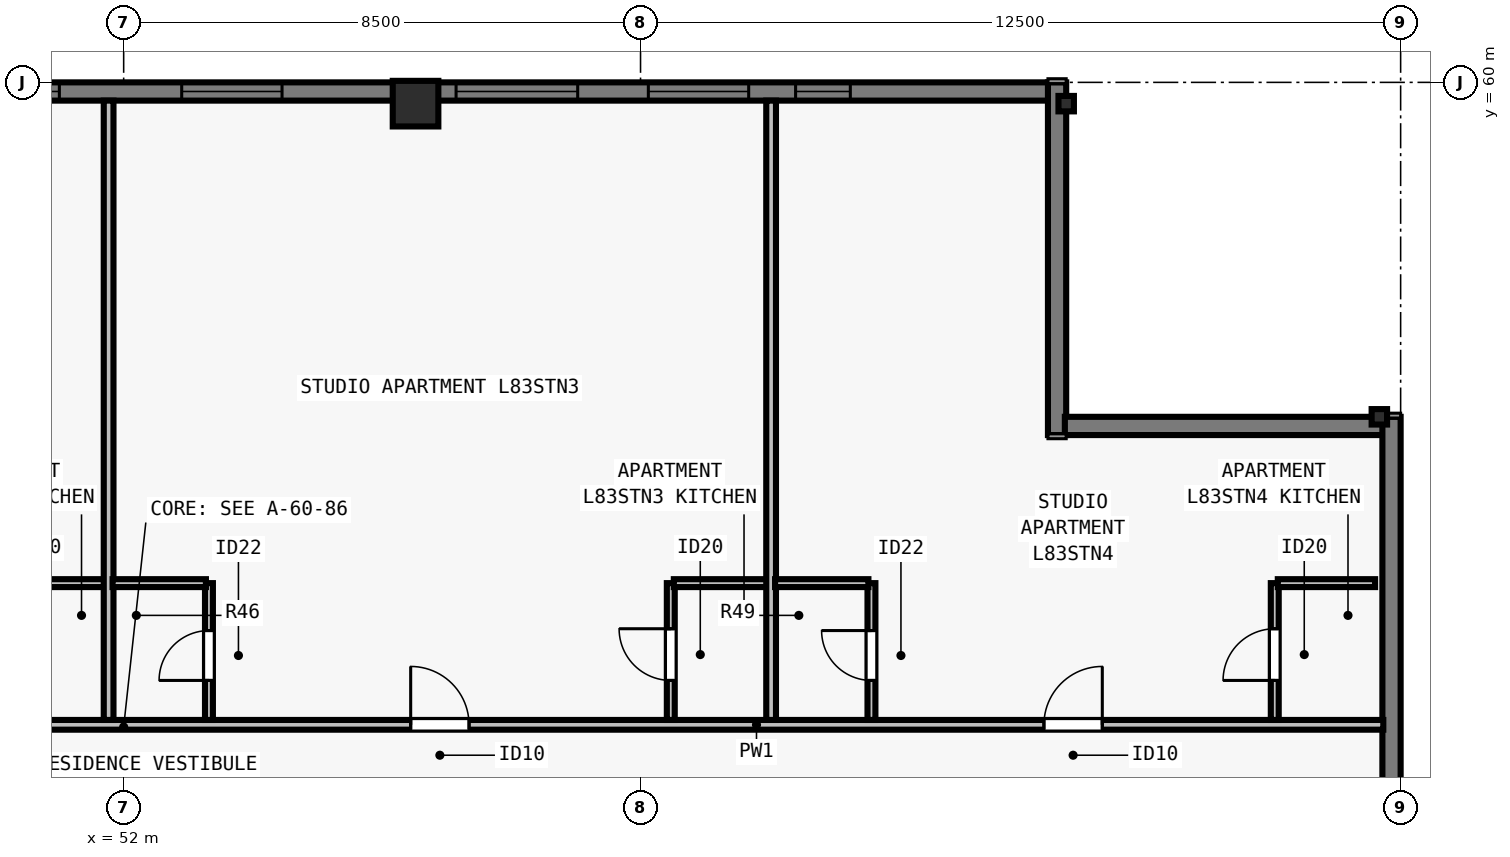
"""IFC4 building model, lengths in metres.
Left out: names, types, materials, properties, quantities, classifications, styles, units other than length and angle.
Written with IfcOpenShell. Run it as: python <this file> out.ifc"""

import sys

from ifc_helpers import new_model, si_unit, direction, frame, frame_2d, origin, origin_2d, place, context, subcontext, project, spatial, rectangle, i_section, extrude, element, fill, save


model = new_model("IFC4")
c1 = context("Model", 3, precision=1e-05, world=origin(), true_north=direction((0.0, 1.0)))
c2 = subcontext(c1, "Body", "Model", "MODEL_VIEW")
j1 = project(units=[si_unit("LENGTHUNIT", "METRE"), si_unit("PLANEANGLEUNIT", "RADIAN")], contexts=[c1])
p1 = place(None, origin())
s1 = spatial("IfcSite", under=j1, at=p1, CompositionType="ELEMENT")
p2 = place(p1, origin())
s2 = spatial("IfcBuilding", under=s1, at=p2, CompositionType="ELEMENT")
p3 = place(p2, frame((0.0, 0.0, 301.5)))
s3 = spatial("IfcBuildingStorey", under=s2, at=p3, CompositionType="ELEMENT", Elevation=301.5)
for number, where, z_axis, x_axis in (
    (1, (72.65, 54.5, 0.0), (0.0, 0.0, 1.0), (0.0, 1.0, 0.0)),
    (2, (67.5, 59.65, 0.0), (0.0, 0.0, 1.0), (1.0, 0.0, 0.0)),
):
    element("IfcColumn", number, at=place(p3, frame(where, z_axis=z_axis, x_axis=x_axis)), inside=s3, PredefinedType="COLUMN", context=c2, shape_type="SweptSolid", body=[
        extrude(i_section(OverallWidth=0.254, OverallDepth=0.254, WebThickness=0.009, FlangeThickness=0.014, FilletRadius=0.013, at=origin_2d()), origin(), (0.0, 0.0, 1.0), 3.5),
    ])
p4 = place(p3, frame((56.8, 59.65, 0.0), z_axis=(0.0, 0.0, 1.0), x_axis=(1.0, 0.0, 0.0)))
e3 = element("IfcColumn", 3, at=p4, inside=s3, PredefinedType="COLUMN", context=c2, shape_type="SweptSolid", body=[
    extrude(rectangle(XDim=0.75, YDim=0.75, at=origin_2d()), origin(), (0.0, 0.0, 1.0), 3.5),
])
p5 = place(p3, frame((36.5, 59.85, 0.0), z_axis=(0.0, 0.0, 1.0), x_axis=(1.0, 0.0, 0.0)))
e4 = element("IfcWall", 4, at=p5, inside=s3, PredefinedType="SOLIDWALL", context=c2, shape_type="SweptSolid", body=[
    extrude(rectangle(XDim=30.722, YDim=0.3, at=frame_2d((15.361, 0.0))), origin(), (0.0, 0.0, 1.0), 3.29),
])
p6 = place(p5, frame((6.019, 0.0, 0.8)))
e5 = element("IfcOpeningElement", 5, at=p6, cuts=e4, PredefinedType="OPENING", context=c2, shape_type="SweptSolid", body=[
    extrude(rectangle(XDim=2.0, YDim=1.758, at=frame_2d((1.0, 0.879))), frame((0.0, 0.16, 0.0), z_axis=(0.0, -1.0, 0.0), x_axis=(1.0, 0.0, 0.0)), (0.0, 0.0, 1.0), 0.32),
])
p7 = place(p5, frame((8.331, 0.0, 0.8)))
e6 = element("IfcOpeningElement", 6, at=p7, cuts=e4, PredefinedType="OPENING", context=c2, shape_type="SweptSolid", body=[
    extrude(rectangle(XDim=1.65, YDim=1.758, at=frame_2d((0.825, 0.879))), frame((0.0, 0.16, 0.0), z_axis=(0.0, -1.0, 0.0), x_axis=(1.0, 0.0, 0.0)), (0.0, 0.0, 1.0), 0.32),
])
p8 = place(p5, frame((12.442, 0.0, 0.8)))
e7 = element("IfcOpeningElement", 7, at=p8, cuts=e4, PredefinedType="OPENING", context=c2, shape_type="SweptSolid", body=[
    extrude(rectangle(XDim=2.0, YDim=1.758, at=frame_2d((1.0, 0.879))), frame((0.0, 0.16, 0.0), z_axis=(0.0, -1.0, 0.0), x_axis=(1.0, 0.0, 0.0)), (0.0, 0.0, 1.0), 0.32),
])
p9 = place(p5, frame((16.455, 0.0, 0.8)))
e8 = element("IfcOpeningElement", 8, at=p9, cuts=e4, PredefinedType="OPENING", context=c2, shape_type="SweptSolid", body=[
    extrude(rectangle(XDim=1.65, YDim=1.758, at=frame_2d((0.825, 0.879))), frame((0.0, 0.16, 0.0), z_axis=(0.0, -1.0, 0.0), x_axis=(1.0, 0.0, 0.0)), (0.0, 0.0, 1.0), 0.32),
])
p10 = place(p5, frame((20.967, 0.0, 0.8)))
e9 = element("IfcOpeningElement", 9, at=p10, cuts=e4, PredefinedType="OPENING", context=c2, shape_type="SweptSolid", body=[
    extrude(rectangle(XDim=2.0, YDim=1.758, at=frame_2d((1.0, 0.879))), frame((0.0, 0.16, 0.0), z_axis=(0.0, -1.0, 0.0), x_axis=(1.0, 0.0, 0.0)), (0.0, 0.0, 1.0), 0.32),
])
p11 = place(p5, frame((24.128, 0.0, 0.8)))
e10 = element("IfcOpeningElement", 10, at=p11, cuts=e4, PredefinedType="OPENING", context=c2, shape_type="SweptSolid", body=[
    extrude(rectangle(XDim=1.65, YDim=1.758, at=frame_2d((0.825, 0.879))), frame((0.0, 0.16, 0.0), z_axis=(0.0, -1.0, 0.0), x_axis=(1.0, 0.0, 0.0)), (0.0, 0.0, 1.0), 0.32),
])
p12 = place(p5, frame((26.55, 0.0, 0.8)))
e11 = element("IfcOpeningElement", 11, at=p12, cuts=e4, PredefinedType="OPENING", context=c2, shape_type="SweptSolid", body=[
    extrude(rectangle(XDim=0.9, YDim=1.75, at=frame_2d((0.45, 0.875))), frame((0.0, 0.16, 0.0), z_axis=(0.0, -1.0, 0.0), x_axis=(1.0, 0.0, 0.0)), (0.0, 0.0, 1.0), 0.32),
])
p13 = place(p3, frame((67.35, 60.0, 0.0), z_axis=(0.0, 0.0, 1.0), x_axis=(0.0, -1.0, 0.0)))
e12 = element("IfcWall", 12, at=p13, inside=s3, PredefinedType="SOLIDWALL", context=c2, shape_type="SweptSolid", body=[
    extrude(rectangle(XDim=5.8, YDim=0.3, at=frame_2d((2.9, 0.0))), origin(), (0.0, 0.0, 1.0), 3.29),
])
p14 = place(p3, frame((67.478, 54.35, 0.0), z_axis=(0.0, 0.0, 1.0), x_axis=(1.0, 0.0, 0.0)))
e13 = element("IfcWall", 13, at=p14, inside=s3, PredefinedType="SOLIDWALL", context=c2, shape_type="SweptSolid", body=[
    extrude(rectangle(XDim=5.244, YDim=0.3, at=frame_2d((2.622, 0.0))), origin(), (0.0, 0.0, 1.0), 3.29),
])
p15 = place(p3, frame((72.85, 54.5, 0.0), z_axis=(0.0, 0.0, 1.0), x_axis=(0.0, -1.0, 0.0)))
e14 = element("IfcWall", 14, at=p15, inside=s3, PredefinedType="SOLIDWALL", context=c2, shape_type="SweptSolid", body=[
    extrude(rectangle(XDim=12.622, YDim=0.3, at=frame_2d((6.311, 0.0))), origin(), (0.0, 0.0, 1.0), 3.29),
])
p16 = place(p15, frame((8.217, 0.0, 0.8)))
e15 = element("IfcOpeningElement", 15, at=p16, cuts=e14, PredefinedType="OPENING", context=c2, shape_type="SweptSolid", body=[
    extrude(rectangle(XDim=1.65, YDim=1.758, at=frame_2d((0.825, 0.879))), frame((0.0, 0.16, 0.0), z_axis=(0.0, -1.0, 0.0), x_axis=(1.0, 0.0, 0.0)), (0.0, 0.0, 1.0), 0.32),
])
p17 = place(p3, frame((31.285, 49.435, 0.0), z_axis=(0.0, 0.0, 1.0), x_axis=(1.0, 0.0, 0.0)))
e16 = element("IfcWall", 16, at=p17, inside=s3, PredefinedType="PARTITIONING", context=c2, shape_type="SweptSolid", body=[
    extrude(rectangle(XDim=41.43, YDim=0.16, at=frame_2d((20.715, 0.0))), origin(), (0.0, 0.0, 1.0), 3.009),
])
p18 = place(p17, frame((4.979, 0.0, 0.0)))
e17 = element("IfcOpeningElement", 17, at=p18, cuts=e16, PredefinedType="OPENING", context=c2, shape_type="SweptSolid", body=[
    extrude(rectangle(XDim=0.96, YDim=2.18, at=frame_2d((0.48, 1.09))), frame((0.0, 0.09, 0.0), z_axis=(0.0, -1.0, 0.0), x_axis=(1.0, 0.0, 0.0)), (0.0, 0.0, 1.0), 0.18),
])
p19 = place(p17, frame((15.145, 0.0, 0.0)))
e18 = element("IfcOpeningElement", 18, at=p19, cuts=e16, PredefinedType="OPENING", context=c2, shape_type="SweptSolid", body=[
    extrude(rectangle(XDim=0.96, YDim=2.18, at=frame_2d((0.48, 1.09))), frame((0.0, 0.09, 0.0), z_axis=(0.0, -1.0, 0.0), x_axis=(1.0, 0.0, 0.0)), (0.0, 0.0, 1.0), 0.18),
])
p20 = place(p17, frame((25.435, 0.0, 0.0)))
e19 = element("IfcOpeningElement", 19, at=p20, cuts=e16, PredefinedType="OPENING", context=c2, shape_type="SweptSolid", body=[
    extrude(rectangle(XDim=0.96, YDim=2.18, at=frame_2d((0.48, 1.09))), frame((0.0, 0.09, 0.0), z_axis=(0.0, -1.0, 0.0), x_axis=(1.0, 0.0, 0.0)), (0.0, 0.0, 1.0), 0.18),
])
p21 = place(p17, frame((35.849, 0.0, 0.0)))
e20 = element("IfcOpeningElement", 20, at=p21, cuts=e16, PredefinedType="OPENING", context=c2, shape_type="SweptSolid", body=[
    extrude(rectangle(XDim=0.96, YDim=2.18, at=frame_2d((0.48, 1.09))), frame((0.0, 0.09, 0.0), z_axis=(0.0, -1.0, 0.0), x_axis=(1.0, 0.0, 0.0)), (0.0, 0.0, 1.0), 0.18),
])
p22 = place(p3, frame((50.153, 51.765, 0.0), z_axis=(0.0, 0.0, 1.0), x_axis=(1.0, 0.0, 0.0)))
e21 = element("IfcWall", 21, at=p22, inside=s3, PredefinedType="PLUMBINGWALL", context=c2, shape_type="SweptSolid", body=[
    extrude(rectangle(XDim=1.6, YDim=0.13, at=frame_2d((0.8, 0.0))), origin(), (0.0, 0.0, 1.0), 3.29),
])
p23 = place(p3, frame((51.752, 49.515, 0.0), z_axis=(0.0, 0.0, 1.0), x_axis=(0.0, 1.0, 0.0)))
e22 = element("IfcWall", 22, at=p23, inside=s3, PredefinedType="PARTITIONING", context=c2, shape_type="SweptSolid", body=[
    extrude(rectangle(XDim=10.185, YDim=0.16, at=frame_2d((5.093, 0.0))), origin(), (0.0, 0.0, 1.0), 3.009),
])
p24 = place(p3, frame((53.403, 49.515, 0.0), z_axis=(0.0, 0.0, 1.0), x_axis=(0.0, 1.0, 0.0)))
e23 = element("IfcWall", 23, at=p24, inside=s3, PredefinedType="PLUMBINGWALL", context=c2, shape_type="SweptSolid", body=[
    extrude(rectangle(XDim=2.25, YDim=0.13, at=frame_2d((1.125, 0.0))), origin(), (0.0, 0.0, 1.0), 3.29),
])
p25 = place(p24, frame((0.65, 0.0, 0.0)))
e24 = element("IfcOpeningElement", 24, at=p25, cuts=e23, PredefinedType="OPENING", context=c2, shape_type="SweptSolid", body=[
    extrude(rectangle(XDim=0.82, YDim=2.1, at=frame_2d((0.41, 1.05))), frame((0.0, 0.075, 0.0), z_axis=(0.0, -1.0, 0.0), x_axis=(1.0, 0.0, 0.0)), (0.0, 0.0, 1.0), 0.15),
])
p26 = place(p3, frame((51.817, 51.765, 0.0), z_axis=(0.0, 0.0, 1.0), x_axis=(1.0, 0.0, 0.0)))
e25 = element("IfcWall", 25, at=p26, inside=s3, PredefinedType="PLUMBINGWALL", context=c2, shape_type="SweptSolid", body=[
    extrude(rectangle(XDim=1.535, YDim=0.13, at=frame_2d((0.768, 0.0))), origin(), (0.0, 0.0, 1.0), 3.29),
])
p27 = place(p3, frame((60.998, 49.515, 0.0), z_axis=(0.0, 0.0, 1.0), x_axis=(0.0, 1.0, 0.0)))
e26 = element("IfcWall", 26, at=p27, inside=s3, PredefinedType="PLUMBINGWALL", context=c2, shape_type="SweptSolid", body=[
    extrude(rectangle(XDim=2.25, YDim=0.13, at=frame_2d((1.125, 0.0))), origin(), (0.0, 0.0, 1.0), 3.29),
])
p28 = place(p27, frame((0.65, 0.0, 0.0)))
e27 = element("IfcOpeningElement", 27, at=p28, cuts=e26, PredefinedType="OPENING", context=c2, shape_type="SweptSolid", body=[
    extrude(rectangle(XDim=0.85, YDim=2.1, at=frame_2d((0.425, 1.05))), frame((0.0, 0.075, 0.0), z_axis=(0.0, -1.0, 0.0), x_axis=(1.0, 0.0, 0.0)), (0.0, 0.0, 1.0), 0.15),
])
p29 = place(p3, frame((61.048, 51.765, 0.0), z_axis=(0.0, 0.0, 1.0), x_axis=(1.0, 0.0, 0.0)))
e28 = element("IfcWall", 28, at=p29, inside=s3, PredefinedType="PLUMBINGWALL", context=c2, shape_type="SweptSolid", body=[
    extrude(rectangle(XDim=1.6, YDim=0.13, at=frame_2d((0.8, 0.0))), origin(), (0.0, 0.0, 1.0), 3.29),
])
p30 = place(p3, frame((62.647, 49.515, 0.0), z_axis=(0.0, 0.0, 1.0), x_axis=(0.0, 1.0, 0.0)))
e29 = element("IfcWall", 29, at=p30, inside=s3, PredefinedType="PARTITIONING", context=c2, shape_type="SweptSolid", body=[
    extrude(rectangle(XDim=10.185, YDim=0.16, at=frame_2d((5.093, 0.0))), origin(), (0.0, 0.0, 1.0), 2.653),
])
p31 = place(p3, frame((64.298, 49.515, 0.0), z_axis=(0.0, 0.0, 1.0), x_axis=(0.0, 1.0, 0.0)))
e30 = element("IfcWall", 30, at=p31, inside=s3, PredefinedType="PLUMBINGWALL", context=c2, shape_type="SweptSolid", body=[
    extrude(rectangle(XDim=2.25, YDim=0.13, at=frame_2d((1.125, 0.0))), origin(), (0.0, 0.0, 1.0), 3.29),
])
p32 = place(p31, frame((0.65, 0.0, 0.0)))
e31 = element("IfcOpeningElement", 31, at=p32, cuts=e30, PredefinedType="OPENING", context=c2, shape_type="SweptSolid", body=[
    extrude(rectangle(XDim=0.82, YDim=2.1, at=frame_2d((0.41, 1.05))), frame((0.0, 0.075, 0.0), z_axis=(0.0, -1.0, 0.0), x_axis=(1.0, 0.0, 0.0)), (0.0, 0.0, 1.0), 0.15),
])
p33 = place(p3, frame((62.712, 51.765, 0.0), z_axis=(0.0, 0.0, 1.0), x_axis=(1.0, 0.0, 0.0)))
e32 = element("IfcWall", 32, at=p33, inside=s3, PredefinedType="PLUMBINGWALL", context=c2, shape_type="SweptSolid", body=[
    extrude(rectangle(XDim=1.535, YDim=0.13, at=frame_2d((0.768, 0.0))), origin(), (0.0, 0.0, 1.0), 3.29),
])
p34 = place(p3, frame((70.93, 49.515, 0.0), z_axis=(0.0, 0.0, 1.0), x_axis=(0.0, 1.0, 0.0)))
e33 = element("IfcWall", 33, at=p34, inside=s3, PredefinedType="PLUMBINGWALL", context=c2, shape_type="SweptSolid", body=[
    extrude(rectangle(XDim=2.25, YDim=0.13, at=frame_2d((1.125, 0.0))), origin(), (0.0, 0.0, 1.0), 3.29),
])
p35 = place(p34, frame((0.65, 0.0, 0.0)))
e34 = element("IfcOpeningElement", 34, at=p35, cuts=e33, PredefinedType="OPENING", context=c2, shape_type="SweptSolid", body=[
    extrude(rectangle(XDim=0.85, YDim=2.1, at=frame_2d((0.425, 1.05))), frame((0.0, 0.075, 0.0), z_axis=(0.0, -1.0, 0.0), x_axis=(1.0, 0.0, 0.0)), (0.0, 0.0, 1.0), 0.15),
])
p36 = place(p3, frame((70.98, 51.765, 0.0), z_axis=(0.0, 0.0, 1.0), x_axis=(1.0, 0.0, 0.0)))
e35 = element("IfcWall", 35, at=p36, inside=s3, PredefinedType="PLUMBINGWALL", context=c2, shape_type="SweptSolid", body=[
    extrude(rectangle(XDim=1.6, YDim=0.13, at=frame_2d((0.8, 0.0))), origin(), (0.0, 0.0, 1.0), 3.29),
])
p37 = place(p8, origin())
e36 = element("IfcWindow", 36, at=p37, inside=s3, PartitioningType="SINGLE_PANEL", PredefinedType="WINDOW", context=c2, shape_type="SweptSolid", body=[
    extrude(rectangle(XDim=2.0, YDim=1.758, at=frame_2d((1.0, 0.879))), frame((0.0, -0.05, 0.0), z_axis=(0.0, -1.0, 0.0), x_axis=(1.0, 0.0, 0.0)), (0.0, 0.0, 1.0), 0.06),
])
fill(e7, e36)
p38 = place(p9, origin())
e37 = element("IfcWindow", 37, at=p38, inside=s3, PartitioningType="SINGLE_PANEL", PredefinedType="WINDOW", context=c2, shape_type="SweptSolid", body=[
    extrude(rectangle(XDim=1.65, YDim=1.758, at=frame_2d((0.825, 0.879))), frame((0.0, -0.05, 0.0), z_axis=(0.0, -1.0, 0.0), x_axis=(1.0, 0.0, 0.0)), (0.0, 0.0, 1.0), 0.06),
])
fill(e8, e37)
p39 = place(p10, origin())
e38 = element("IfcWindow", 38, at=p39, inside=s3, PartitioningType="SINGLE_PANEL", PredefinedType="WINDOW", context=c2, shape_type="SweptSolid", body=[
    extrude(rectangle(XDim=2.0, YDim=1.758, at=frame_2d((1.0, 0.879))), frame((0.0, -0.05, 0.0), z_axis=(0.0, -1.0, 0.0), x_axis=(1.0, 0.0, 0.0)), (0.0, 0.0, 1.0), 0.06),
])
fill(e9, e38)
p40 = place(p11, origin())
e39 = element("IfcWindow", 39, at=p40, inside=s3, PartitioningType="SINGLE_PANEL", PredefinedType="WINDOW", context=c2, shape_type="SweptSolid", body=[
    extrude(rectangle(XDim=1.65, YDim=1.758, at=frame_2d((0.825, 0.879))), frame((0.0, -0.05, 0.0), z_axis=(0.0, -1.0, 0.0), x_axis=(1.0, 0.0, 0.0)), (0.0, 0.0, 1.0), 0.06),
])
fill(e10, e39)
p41 = place(p12, origin())
e40 = element("IfcWindow", 40, at=p41, inside=s3, PartitioningType="SINGLE_PANEL", PredefinedType="WINDOW", context=c2, shape_type="SweptSolid", body=[
    extrude(rectangle(XDim=0.9, YDim=1.75, at=frame_2d((0.45, 0.875))), frame((0.0, -0.04, 0.0), z_axis=(0.0, -1.0, 0.0), x_axis=(1.0, 0.0, 0.0)), (0.0, 0.0, 1.0), 0.06),
])
fill(e11, e40)
p42 = place(p25, origin())
e41 = element("IfcDoor", 41, at=p42, inside=s3, OperationType="SINGLE_SWING_LEFT", PredefinedType="DOOR", context=c2, shape_type="SweptSolid", body=[
    extrude(rectangle(XDim=0.82, YDim=2.1, at=frame_2d((0.41, 1.05))), frame((0.0, 0.025, 0.0), z_axis=(0.0, -1.0, 0.0), x_axis=(1.0, 0.0, 0.0)), (0.0, 0.0, 1.0), 0.05),
])
fill(e24, e41)
p43 = place(p28, origin())
e42 = element("IfcDoor", 42, at=p43, inside=s3, OperationType="SINGLE_SWING_RIGHT", PredefinedType="DOOR", context=c2, shape_type="SweptSolid", body=[
    extrude(rectangle(XDim=0.85, YDim=2.1, at=frame_2d((0.425, 1.05))), frame((0.0, 0.025, 0.0), z_axis=(0.0, -1.0, 0.0), x_axis=(1.0, 0.0, 0.0)), (0.0, 0.0, 1.0), 0.05),
])
fill(e27, e42)
p44 = place(p20, origin())
e43 = element("IfcDoor", 43, at=p44, inside=s3, OperationType="SINGLE_SWING_LEFT", PredefinedType="DOOR", context=c2, shape_type="SweptSolid", body=[
    extrude(rectangle(XDim=0.96, YDim=2.18, at=frame_2d((0.48, 1.09))), frame((0.0, 0.025, 0.0), z_axis=(0.0, -1.0, 0.0), x_axis=(1.0, 0.0, 0.0)), (0.0, 0.0, 1.0), 0.05),
])
fill(e19, e43)
p45 = place(p32, origin())
e44 = element("IfcDoor", 44, at=p45, inside=s3, OperationType="SINGLE_SWING_RIGHT", PredefinedType="DOOR", context=c2, shape_type="SweptSolid", body=[
    extrude(rectangle(XDim=0.82, YDim=2.1, at=frame_2d((0.41, 1.05))), frame((0.0, 0.025, 0.0), z_axis=(0.0, -1.0, 0.0), x_axis=(1.0, 0.0, 0.0)), (0.0, 0.0, 1.0), 0.05),
])
fill(e31, e44)
p46 = place(p35, origin())
e45 = element("IfcDoor", 45, at=p46, inside=s3, OperationType="SINGLE_SWING_LEFT", PredefinedType="DOOR", context=c2, shape_type="SweptSolid", body=[
    extrude(rectangle(XDim=0.85, YDim=2.1, at=frame_2d((0.425, 1.05))), frame((0.0, 0.025, 0.0), z_axis=(0.0, -1.0, 0.0), x_axis=(1.0, 0.0, 0.0)), (0.0, 0.0, 1.0), 0.05),
])
fill(e34, e45)
p47 = place(p21, origin())
e46 = element("IfcDoor", 46, at=p47, inside=s3, OperationType="SINGLE_SWING_RIGHT", PredefinedType="DOOR", context=c2, shape_type="SweptSolid", body=[
    extrude(rectangle(XDim=0.96, YDim=2.18, at=frame_2d((0.48, 1.09))), frame((0.0, 0.025, 0.0), z_axis=(0.0, -1.0, 0.0), x_axis=(1.0, 0.0, 0.0)), (0.0, 0.0, 1.0), 0.05),
])
fill(e20, e46)
save(model, sys.argv[1])
